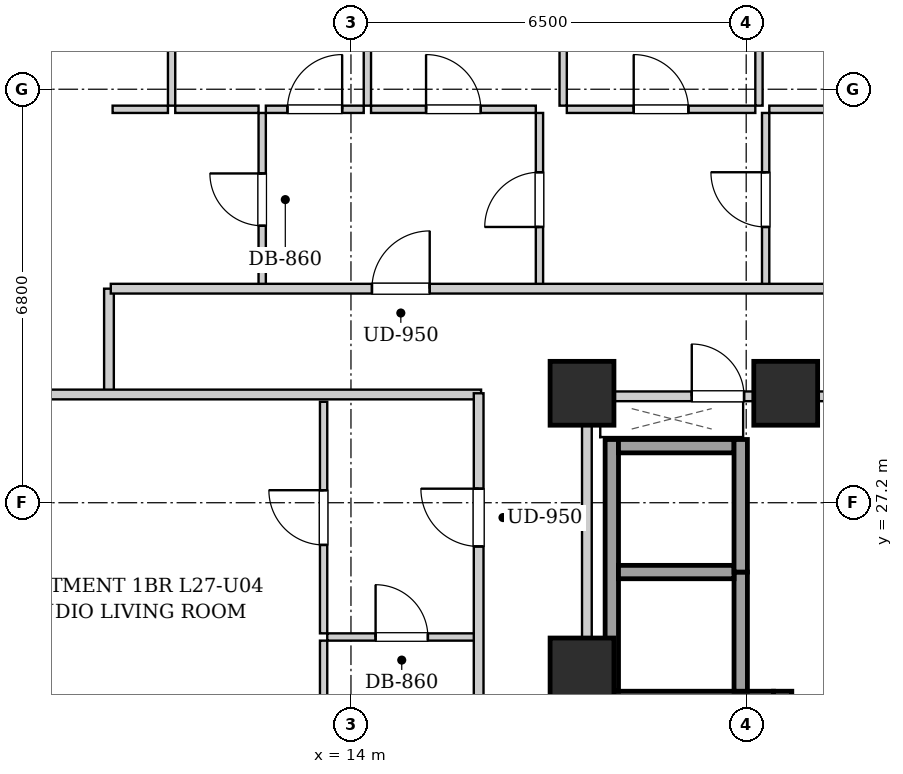
"""IFC4 building model, lengths in metres.
Left out: names, types, materials, properties, quantities, classifications, styles, units other than length and angle.
Written with IfcOpenShell. Run it as: python <this file> out.ifc"""

import sys

from ifc_helpers import new_model, si_unit, direction, frame, frame_2d, origin, origin_2d, place, context, subcontext, project, spatial, rectangle, extrude, element, fill, save


model = new_model("IFC4")
c1 = context("Model", 3, precision=1e-05, world=origin(), true_north=direction((0.0, 1.0)))
c2 = subcontext(c1, "Body", "Model", "MODEL_VIEW")
j1 = project(units=[si_unit("LENGTHUNIT", "METRE"), si_unit("PLANEANGLEUNIT", "RADIAN")], contexts=[c1])
p1 = place(None, origin())
s1 = spatial("IfcSite", under=j1, at=p1, CompositionType="ELEMENT")
p2 = place(p1, origin())
s2 = spatial("IfcBuilding", under=s1, at=p2, CompositionType="ELEMENT")
p3 = place(p2, frame((0.0, 0.0, 97.5)))
s3 = spatial("IfcBuildingStorey", under=s2, at=p3, CompositionType="ELEMENT", Elevation=97.5)
for number, where, z_axis, x_axis in (
    (1, (17.8, 29.0, 0.0), (0.0, 0.0, 1.0), (1.0, 0.0, 0.0)),
    (2, (21.15, 29.0, 0.0), (0.0, 0.0, 1.0), (1.0, 0.0, 0.0)),
    (3, (17.8, 24.45, 0.0), (0.0, 0.0, 1.0), (1.0, 0.0, 0.0)),
):
    element("IfcColumn", number, at=place(p3, frame(where, z_axis=z_axis, x_axis=x_axis)), inside=s3, PredefinedType="COLUMN", context=c2, shape_type="SweptSolid", body=[
        extrude(rectangle(XDim=1.05, YDim=1.05, at=origin_2d()), origin(), (0.0, 0.0, 1.0), 3.2),
    ])
for number, where, z_axis, x_axis in (
    (4, (17.95, 15.1, 0.0), (0.0, 0.0, 1.0), (0.0, 1.0, 0.0)),
    (5, (21.1, 15.1, 0.0), (0.0, 0.0, 1.0), (0.0, 1.0, 0.0)),
):
    element("IfcWall", number, at=place(p3, frame(where, z_axis=z_axis, x_axis=x_axis)), inside=s3, PredefinedType="SHEAR", context=c2, shape_type="SweptSolid", body=[
        extrude(rectangle(XDim=9.0, YDim=0.3, at=frame_2d((4.5, 0.0))), origin(), (0.0, 0.0, 1.0), 2.94),
    ])
p4 = place(p3, frame((18.1, 23.95, 0.0), z_axis=(0.0, 0.0, 1.0), x_axis=(1.0, 0.0, 0.0)))
e6 = element("IfcWall", 6, at=p4, inside=s3, PredefinedType="SHEAR", context=c2, shape_type="SweptSolid", body=[
    extrude(rectangle(XDim=2.85, YDim=0.3, at=frame_2d((1.425, 0.0))), origin(), (0.0, 0.0, 1.0), 2.94),
])
p5 = place(p3, frame((18.29, 24.1, 0.0), z_axis=(0.0, 0.0, 1.0), x_axis=(0.0, 1.0, 0.0)))
e7 = element("IfcWall", 7, at=p5, inside=s3, PredefinedType="SHEAR", context=c2, shape_type="SweptSolid", body=[
    extrude(rectangle(XDim=4.14, YDim=0.22, at=frame_2d((2.07, 0.0))), origin(), (0.0, 0.0, 1.0), 2.94),
])
p6 = place(p3, frame((20.41, 24.1, 0.0), z_axis=(0.0, 0.0, 1.0), x_axis=(0.0, 1.0, 0.0)))
e8 = element("IfcWall", 8, at=p6, inside=s3, PredefinedType="SHEAR", context=c2, shape_type="SweptSolid", body=[
    extrude(rectangle(XDim=1.96, YDim=0.22, at=frame_2d((0.98, 0.0))), origin(), (0.0, 0.0, 1.0), 2.94),
])
for number, where, z_axis, x_axis in (
    (9, (18.4, 26.06, 0.0), (0.0, 0.0, 1.0), (1.0, 0.0, 0.0)),
    (10, (18.4, 28.13, 0.0), (0.0, 0.0, 1.0), (1.0, 0.0, 0.0)),
):
    element("IfcWall", number, at=place(p3, frame(where, z_axis=z_axis, x_axis=x_axis)), inside=s3, PredefinedType="SHEAR", context=c2, shape_type="SweptSolid", body=[
        extrude(rectangle(XDim=1.9, YDim=0.22, at=frame_2d((0.95, 0.0))), origin(), (0.0, 0.0, 1.0), 2.94),
    ])
p7 = place(p3, frame((20.41, 26.06, 0.0), z_axis=(0.0, 0.0, 1.0), x_axis=(0.0, 1.0, 0.0)))
e11 = element("IfcWall", 11, at=p7, inside=s3, PredefinedType="SHEAR", context=c2, shape_type="SweptSolid", body=[
    extrude(rectangle(XDim=2.18, YDim=0.22, at=frame_2d((1.09, 0.0))), origin(), (0.0, 0.0, 1.0), 2.94),
])
p8 = place(p3, frame((17.88, 24.12, 0.0), z_axis=(0.0, 0.0, 1.0), x_axis=(0.0, 1.0, 0.0)))
e12 = element("IfcWall", 12, at=p8, inside=s3, PredefinedType="PARTITIONING", context=c2, shape_type="SweptSolid", body=[
    extrude(rectangle(XDim=4.76, YDim=0.16, at=frame_2d((2.38, 0.0))), origin(), (0.0, 0.0, 1.0), 2.275),
])
p9 = place(p3, frame((17.96, 28.95, 0.0), z_axis=(0.0, 0.0, 1.0), x_axis=(1.0, 0.0, 0.0)))
e13 = element("IfcWall", 13, at=p9, inside=s3, PredefinedType="PARTITIONING", context=c2, shape_type="SweptSolid", body=[
    extrude(rectangle(XDim=4.29, YDim=0.16, at=frame_2d((2.145, 0.0))), origin(), (0.0, 0.0, 1.0), 2.313),
])
p10 = place(p9, frame((1.645, 0.0, 0.0)))
e14 = element("IfcOpeningElement", 14, at=p10, cuts=e13, PredefinedType="OPENING", context=c2, shape_type="SweptSolid", body=[
    extrude(rectangle(XDim=0.86, YDim=2.05, at=frame_2d((0.43, 1.025))), frame((0.0, 0.09, 0.0), z_axis=(0.0, -1.0, 0.0), x_axis=(1.0, 0.0, 0.0)), (0.0, 0.0, 1.0), 0.18),
])
p11 = place(p3, frame((10.02, 28.98, 0.0), z_axis=(0.0, 0.0, 1.0), x_axis=(0.0, 1.0, 0.0)))
e15 = element("IfcWall", 15, at=p11, inside=s3, PredefinedType="PARTITIONING", context=c2, shape_type="SweptSolid", body=[
    extrude(rectangle(XDim=1.74, YDim=0.16, at=frame_2d((0.87, 0.0))), origin(), (0.0, 0.0, 1.0), 2.94),
])
p12 = place(p3, frame((7.78, 28.98, 0.0), z_axis=(0.0, 0.0, 1.0), x_axis=(1.0, 0.0, 0.0)))
e16 = element("IfcWall", 16, at=p12, inside=s3, PredefinedType="PARTITIONING", context=c2, shape_type="SweptSolid", body=[
    extrude(rectangle(XDim=8.36, YDim=0.16, at=frame_2d((4.18, 0.0))), origin(), (0.0, 0.0, 1.0), 2.313),
])
p13 = place(p3, frame((12.54, 30.76, 0.0), z_axis=(0.0, 0.0, 1.0), x_axis=(0.0, 1.0, 0.0)))
e17 = element("IfcWall", 17, at=p13, inside=s3, PredefinedType="PARTITIONING", context=c2, shape_type="SweptSolid", body=[
    extrude(rectangle(XDim=2.85, YDim=0.12, at=frame_2d((1.425, 0.0))), origin(), (0.0, 0.0, 1.0), 2.94),
])
p14 = place(p13, frame((0.995, 0.0, 0.0)))
e18 = element("IfcOpeningElement", 18, at=p14, cuts=e17, PredefinedType="OPENING", context=c2, shape_type="SweptSolid", body=[
    extrude(rectangle(XDim=0.86, YDim=2.05, at=frame_2d((0.43, 1.025))), frame((0.0, 0.07, 0.0), z_axis=(0.0, -1.0, 0.0), x_axis=(1.0, 0.0, 0.0)), (0.0, 0.0, 1.0), 0.14),
])
p15 = place(p3, frame((10.08, 33.67, 0.0), z_axis=(0.0, 0.0, 1.0), x_axis=(1.0, 0.0, 0.0)))
e19 = element("IfcWall", 19, at=p15, inside=s3, PredefinedType="PARTITIONING", context=c2, shape_type="SweptSolid", body=[
    extrude(rectangle(XDim=0.91, YDim=0.12, at=frame_2d((0.455, 0.0))), origin(), (0.0, 0.0, 1.0), 2.94),
])
p16 = place(p3, frame((11.11, 33.67, 0.0), z_axis=(0.0, 0.0, 1.0), x_axis=(1.0, 0.0, 0.0)))
e20 = element("IfcWall", 20, at=p16, inside=s3, PredefinedType="PARTITIONING", context=c2, shape_type="SweptSolid", body=[
    extrude(rectangle(XDim=1.37, YDim=0.12, at=frame_2d((0.685, 0.0))), origin(), (0.0, 0.0, 1.0), 2.94),
])
p17 = place(p3, frame((17.1, 30.76, 0.0), z_axis=(0.0, 0.0, 1.0), x_axis=(0.0, 1.0, 0.0)))
e21 = element("IfcWall", 21, at=p17, inside=s3, PredefinedType="PARTITIONING", context=c2, shape_type="SweptSolid", body=[
    extrude(rectangle(XDim=2.85, YDim=0.12, at=frame_2d((1.425, 0.0))), origin(), (0.0, 0.0, 1.0), 2.94),
])
p18 = place(p17, frame((0.975, 0.0, 0.0)))
e22 = element("IfcOpeningElement", 22, at=p18, cuts=e21, PredefinedType="OPENING", context=c2, shape_type="SweptSolid", body=[
    extrude(rectangle(XDim=0.9, YDim=2.05, at=frame_2d((0.45, 1.025))), frame((0.0, 0.07, 0.0), z_axis=(0.0, -1.0, 0.0), x_axis=(1.0, 0.0, 0.0)), (0.0, 0.0, 1.0), 0.14),
])
p19 = place(p3, frame((12.6, 33.67, 0.0), z_axis=(0.0, 0.0, 1.0), x_axis=(1.0, 0.0, 0.0)))
e23 = element("IfcWall", 23, at=p19, inside=s3, PredefinedType="PARTITIONING", context=c2, shape_type="SweptSolid", body=[
    extrude(rectangle(XDim=1.61, YDim=0.12, at=frame_2d((0.805, 0.0))), origin(), (0.0, 0.0, 1.0), 2.94),
])
p20 = place(p19, frame((0.355, 0.0, 0.0)))
e24 = element("IfcOpeningElement", 24, at=p20, cuts=e23, PredefinedType="OPENING", context=c2, shape_type="SweptSolid", body=[
    extrude(rectangle(XDim=0.9, YDim=2.05, at=frame_2d((0.45, 1.025))), frame((0.0, 0.07, 0.0), z_axis=(0.0, -1.0, 0.0), x_axis=(1.0, 0.0, 0.0)), (0.0, 0.0, 1.0), 0.14),
])
p21 = place(p3, frame((14.33, 33.67, 0.0), z_axis=(0.0, 0.0, 1.0), x_axis=(1.0, 0.0, 0.0)))
e25 = element("IfcWall", 25, at=p21, inside=s3, PredefinedType="PARTITIONING", context=c2, shape_type="SweptSolid", body=[
    extrude(rectangle(XDim=2.71, YDim=0.12, at=frame_2d((1.355, 0.0))), origin(), (0.0, 0.0, 1.0), 2.94),
])
p22 = place(p21, frame((0.905, 0.0, 0.0)))
e26 = element("IfcOpeningElement", 26, at=p22, cuts=e25, PredefinedType="OPENING", context=c2, shape_type="SweptSolid", body=[
    extrude(rectangle(XDim=0.9, YDim=2.05, at=frame_2d((0.45, 1.025))), frame((0.0, 0.07, 0.0), z_axis=(0.0, -1.0, 0.0), x_axis=(1.0, 0.0, 0.0)), (0.0, 0.0, 1.0), 0.14),
])
p23 = place(p3, frame((20.82, 30.76, 0.0), z_axis=(0.0, 0.0, 1.0), x_axis=(0.0, 1.0, 0.0)))
e27 = element("IfcWall", 27, at=p23, inside=s3, PredefinedType="PARTITIONING", context=c2, shape_type="SweptSolid", body=[
    extrude(rectangle(XDim=2.85, YDim=0.12, at=frame_2d((1.425, 0.0))), origin(), (0.0, 0.0, 1.0), 2.94),
])
p24 = place(p23, frame((0.975, 0.0, 0.0)))
e28 = element("IfcOpeningElement", 28, at=p24, cuts=e27, PredefinedType="OPENING", context=c2, shape_type="SweptSolid", body=[
    extrude(rectangle(XDim=0.9, YDim=2.05, at=frame_2d((0.45, 1.025))), frame((0.0, 0.07, 0.0), z_axis=(0.0, -1.0, 0.0), x_axis=(1.0, 0.0, 0.0)), (0.0, 0.0, 1.0), 0.14),
])
p25 = place(p3, frame((17.55, 33.67, 0.0), z_axis=(0.0, 0.0, 1.0), x_axis=(1.0, 0.0, 0.0)))
e29 = element("IfcWall", 29, at=p25, inside=s3, PredefinedType="PARTITIONING", context=c2, shape_type="SweptSolid", body=[
    extrude(rectangle(XDim=3.1, YDim=0.12, at=frame_2d((1.55, 0.0))), origin(), (0.0, 0.0, 1.0), 2.94),
])
p26 = place(p25, frame((1.1, 0.0, 0.0)))
e30 = element("IfcOpeningElement", 30, at=p26, cuts=e29, PredefinedType="OPENING", context=c2, shape_type="SweptSolid", body=[
    extrude(rectangle(XDim=0.9, YDim=2.05, at=frame_2d((0.45, 1.025))), frame((0.0, 0.07, 0.0), z_axis=(0.0, -1.0, 0.0), x_axis=(1.0, 0.0, 0.0)), (0.0, 0.0, 1.0), 0.14),
])
p27 = place(p3, frame((20.88, 33.67, 0.0), z_axis=(0.0, 0.0, 1.0), x_axis=(1.0, 0.0, 0.0)))
e31 = element("IfcWall", 31, at=p27, inside=s3, PredefinedType="PARTITIONING", context=c2, shape_type="SweptSolid", body=[
    extrude(rectangle(XDim=2.99, YDim=0.12, at=frame_2d((1.495, 0.0))), origin(), (0.0, 0.0, 1.0), 2.94),
])
p28 = place(p27, frame((1.045, 0.0, 0.0)))
e32 = element("IfcOpeningElement", 32, at=p28, cuts=e31, PredefinedType="OPENING", context=c2, shape_type="SweptSolid", body=[
    extrude(rectangle(XDim=0.9, YDim=2.05, at=frame_2d((0.45, 1.025))), frame((0.0, 0.07, 0.0), z_axis=(0.0, -1.0, 0.0), x_axis=(1.0, 0.0, 0.0)), (0.0, 0.0, 1.0), 0.14),
])
p29 = place(p3, frame((11.05, 33.73, 0.0), z_axis=(0.0, 0.0, 1.0), x_axis=(0.0, 1.0, 0.0)))
e33 = element("IfcWall", 33, at=p29, inside=s3, PredefinedType="PARTITIONING", context=c2, shape_type="SweptSolid", body=[
    extrude(rectangle(XDim=9.29, YDim=0.12, at=frame_2d((4.645, 0.0))), origin(), (0.0, 0.0, 1.0), 2.94),
])
p30 = place(p29, frame((4.18, 0.0, 0.0)))
e34 = element("IfcOpeningElement", 34, at=p30, cuts=e33, PredefinedType="OPENING", context=c2, shape_type="SweptSolid", body=[
    extrude(rectangle(XDim=0.9, YDim=2.05, at=frame_2d((0.45, 1.025))), frame((0.0, 0.07, 0.0), z_axis=(0.0, -1.0, 0.0), x_axis=(1.0, 0.0, 0.0)), (0.0, 0.0, 1.0), 0.14),
])
p31 = place(p3, frame((14.27, 33.73, 0.0), z_axis=(0.0, 0.0, 1.0), x_axis=(0.0, 1.0, 0.0)))
e35 = element("IfcWall", 35, at=p31, inside=s3, PredefinedType="PARTITIONING", context=c2, shape_type="SweptSolid", body=[
    extrude(rectangle(XDim=9.29, YDim=0.12, at=frame_2d((4.645, 0.0))), origin(), (0.0, 0.0, 1.0), 2.94),
])
p32 = place(p31, frame((4.18, 0.0, 0.0)))
e36 = element("IfcOpeningElement", 36, at=p32, cuts=e35, PredefinedType="OPENING", context=c2, shape_type="SweptSolid", body=[
    extrude(rectangle(XDim=0.9, YDim=2.05, at=frame_2d((0.45, 1.025))), frame((0.0, 0.07, 0.0), z_axis=(0.0, -1.0, 0.0), x_axis=(1.0, 0.0, 0.0)), (0.0, 0.0, 1.0), 0.14),
])
p33 = place(p3, frame((17.49, 33.73, 0.0), z_axis=(0.0, 0.0, 1.0), x_axis=(0.0, 1.0, 0.0)))
e37 = element("IfcWall", 37, at=p33, inside=s3, PredefinedType="PARTITIONING", context=c2, shape_type="SweptSolid", body=[
    extrude(rectangle(XDim=9.29, YDim=0.12, at=frame_2d((4.645, 0.0))), origin(), (0.0, 0.0, 1.0), 2.94),
])
p34 = place(p33, frame((4.18, 0.0, 0.0)))
e38 = element("IfcOpeningElement", 38, at=p34, cuts=e37, PredefinedType="OPENING", context=c2, shape_type="SweptSolid", body=[
    extrude(rectangle(XDim=0.9, YDim=2.05, at=frame_2d((0.45, 1.025))), frame((0.0, 0.07, 0.0), z_axis=(0.0, -1.0, 0.0), x_axis=(1.0, 0.0, 0.0)), (0.0, 0.0, 1.0), 0.14),
])
p35 = place(p3, frame((20.71, 33.73, 0.0), z_axis=(0.0, 0.0, 1.0), x_axis=(0.0, 1.0, 0.0)))
e39 = element("IfcWall", 39, at=p35, inside=s3, PredefinedType="PARTITIONING", context=c2, shape_type="SweptSolid", body=[
    extrude(rectangle(XDim=9.29, YDim=0.12, at=frame_2d((4.645, 0.0))), origin(), (0.0, 0.0, 1.0), 2.94),
])
p36 = place(p35, frame((4.18, 0.0, 0.0)))
e40 = element("IfcOpeningElement", 40, at=p36, cuts=e39, PredefinedType="OPENING", context=c2, shape_type="SweptSolid", body=[
    extrude(rectangle(XDim=0.9, YDim=2.05, at=frame_2d((0.45, 1.025))), frame((0.0, 0.07, 0.0), z_axis=(0.0, -1.0, 0.0), x_axis=(1.0, 0.0, 0.0)), (0.0, 0.0, 1.0), 0.14),
])
p37 = place(p3, frame((13.61, 24.992, 0.0), z_axis=(0.0, 0.0, 1.0), x_axis=(1.0, 0.0, 0.0)))
e41 = element("IfcWall", 41, at=p37, inside=s3, PredefinedType="PARTITIONING", context=c2, shape_type="SweptSolid", body=[
    extrude(rectangle(XDim=2.45, YDim=0.12, at=frame_2d((1.225, 0.0))), origin(), (0.0, 0.0, 1.0), 2.94),
])
p38 = place(p37, frame((0.795, 0.0, 0.0)))
e42 = element("IfcOpeningElement", 42, at=p38, cuts=e41, PredefinedType="OPENING", context=c2, shape_type="SweptSolid", body=[
    extrude(rectangle(XDim=0.86, YDim=2.05, at=frame_2d((0.43, 1.025))), frame((0.0, 0.07, 0.0), z_axis=(0.0, -1.0, 0.0), x_axis=(1.0, 0.0, 0.0)), (0.0, 0.0, 1.0), 0.14),
])
p39 = place(p3, frame((13.55, 23.082, 0.0), z_axis=(0.0, 0.0, 1.0), x_axis=(0.0, 1.0, 0.0)))
e43 = element("IfcWall", 43, at=p39, inside=s3, PredefinedType="PARTITIONING", context=c2, shape_type="SweptSolid", body=[
    extrude(rectangle(XDim=1.85, YDim=0.12, at=frame_2d((0.925, 0.0))), origin(), (0.0, 0.0, 1.0), 2.94),
])
p40 = place(p3, frame((13.55, 25.052, 0.0), z_axis=(0.0, 0.0, 1.0), x_axis=(0.0, 1.0, 0.0)))
e44 = element("IfcWall", 44, at=p40, inside=s3, PredefinedType="PARTITIONING", context=c2, shape_type="SweptSolid", body=[
    extrude(rectangle(XDim=3.808, YDim=0.12, at=frame_2d((1.904, 0.0))), origin(), (0.0, 0.0, 1.0), 2.94),
])
p41 = place(p40, frame((1.454, 0.0, 0.0)))
e45 = element("IfcOpeningElement", 45, at=p41, cuts=e44, PredefinedType="OPENING", context=c2, shape_type="SweptSolid", body=[
    extrude(rectangle(XDim=0.9, YDim=2.05, at=frame_2d((0.45, 1.025))), frame((0.0, 0.07, 0.0), z_axis=(0.0, -1.0, 0.0), x_axis=(1.0, 0.0, 0.0)), (0.0, 0.0, 1.0), 0.14),
])
p42 = place(p3, frame((10.05, 30.72, 0.0), z_axis=(0.0, 0.0, 1.0), x_axis=(1.0, 0.0, 0.0)))
e46 = element("IfcWall", 46, at=p42, inside=s3, PredefinedType="PARTITIONING", context=c2, shape_type="SweptSolid", body=[
    extrude(rectangle(XDim=30.8, YDim=0.16, at=frame_2d((15.4, 0.0))), origin(), (0.0, 0.0, 1.0), 2.94),
])
p43 = place(p42, frame((4.295, 0.0, 0.0)))
e47 = element("IfcOpeningElement", 47, at=p43, cuts=e46, PredefinedType="OPENING", context=c2, shape_type="SweptSolid", body=[
    extrude(rectangle(XDim=0.95, YDim=2.1, at=frame_2d((0.475, 1.05))), frame((0.0, 0.09, 0.0), z_axis=(0.0, -1.0, 0.0), x_axis=(1.0, 0.0, 0.0)), (0.0, 0.0, 1.0), 0.18),
])
p44 = place(p3, frame((16.1, 15.07, 0.0), z_axis=(0.0, 0.0, 1.0), x_axis=(0.0, 1.0, 0.0)))
e48 = element("IfcWall", 48, at=p44, inside=s3, PredefinedType="PARTITIONING", context=c2, shape_type="SweptSolid", body=[
    extrude(rectangle(XDim=13.93, YDim=0.16, at=frame_2d((6.965, 0.0))), origin(), (0.0, 0.0, 1.0), 2.94),
])
p45 = place(p44, frame((4.661, 0.0, 0.0)))
e49 = element("IfcOpeningElement", 49, at=p45, cuts=e48, PredefinedType="OPENING", context=c2, shape_type="SweptSolid", body=[
    extrude(rectangle(XDim=0.95, YDim=2.1, at=frame_2d((0.475, 1.05))), frame((0.0, 0.09, 0.0), z_axis=(0.0, -1.0, 0.0), x_axis=(1.0, 0.0, 0.0)), (0.0, 0.0, 1.0), 0.18),
])
p46 = place(p44, frame((11.411, 0.0, 0.0)))
e50 = element("IfcOpeningElement", 50, at=p46, cuts=e48, PredefinedType="OPENING", context=c2, shape_type="SweptSolid", body=[
    extrude(rectangle(XDim=0.95, YDim=2.1, at=frame_2d((0.475, 1.05))), frame((0.0, 0.09, 0.0), z_axis=(0.0, -1.0, 0.0), x_axis=(1.0, 0.0, 0.0)), (0.0, 0.0, 1.0), 0.18),
])
p47 = place(p10, origin())
e51 = element("IfcDoor", 51, at=p47, inside=s3, OperationType="SINGLE_SWING_LEFT", PredefinedType="DOOR", context=c2, shape_type="SweptSolid", body=[
    extrude(rectangle(XDim=0.86, YDim=2.05, at=frame_2d((0.43, 1.025))), frame((0.0, 0.025, 0.0), z_axis=(0.0, -1.0, 0.0), x_axis=(1.0, 0.0, 0.0)), (0.0, 0.0, 1.0), 0.05),
])
fill(e14, e51)
p48 = place(p14, origin())
e52 = element("IfcDoor", 52, at=p48, inside=s3, OperationType="SINGLE_SWING_RIGHT", PredefinedType="DOOR", context=c2, shape_type="SweptSolid", body=[
    extrude(rectangle(XDim=0.86, YDim=2.05, at=frame_2d((0.43, 1.025))), frame((0.0, 0.025, 0.0), z_axis=(0.0, -1.0, 0.0), x_axis=(1.0, 0.0, 0.0)), (0.0, 0.0, 1.0), 0.05),
])
fill(e18, e52)
p49 = place(p18, origin())
e53 = element("IfcDoor", 53, at=p49, inside=s3, OperationType="SINGLE_SWING_LEFT", PredefinedType="DOOR", context=c2, shape_type="SweptSolid", body=[
    extrude(rectangle(XDim=0.9, YDim=2.05, at=frame_2d((0.45, 1.025))), frame((0.0, 0.025, 0.0), z_axis=(0.0, -1.0, 0.0), x_axis=(1.0, 0.0, 0.0)), (0.0, 0.0, 1.0), 0.05),
])
fill(e22, e53)
p50 = place(p20, origin())
e54 = element("IfcDoor", 54, at=p50, inside=s3, OperationType="SINGLE_SWING_RIGHT", PredefinedType="DOOR", context=c2, shape_type="SweptSolid", body=[
    extrude(rectangle(XDim=0.9, YDim=2.05, at=frame_2d((0.45, 1.025))), frame((0.0, 0.025, 0.0), z_axis=(0.0, -1.0, 0.0), x_axis=(1.0, 0.0, 0.0)), (0.0, 0.0, 1.0), 0.05),
])
fill(e24, e54)
p51 = place(p22, origin())
e55 = element("IfcDoor", 55, at=p51, inside=s3, OperationType="SINGLE_SWING_LEFT", PredefinedType="DOOR", context=c2, shape_type="SweptSolid", body=[
    extrude(rectangle(XDim=0.9, YDim=2.05, at=frame_2d((0.45, 1.025))), frame((0.0, 0.025, 0.0), z_axis=(0.0, -1.0, 0.0), x_axis=(1.0, 0.0, 0.0)), (0.0, 0.0, 1.0), 0.05),
])
fill(e26, e55)
p52 = place(p24, origin())
e56 = element("IfcDoor", 56, at=p52, inside=s3, OperationType="SINGLE_SWING_RIGHT", PredefinedType="DOOR", context=c2, shape_type="SweptSolid", body=[
    extrude(rectangle(XDim=0.9, YDim=2.05, at=frame_2d((0.45, 1.025))), frame((0.0, 0.025, 0.0), z_axis=(0.0, -1.0, 0.0), x_axis=(1.0, 0.0, 0.0)), (0.0, 0.0, 1.0), 0.05),
])
fill(e28, e56)
p53 = place(p26, origin())
e57 = element("IfcDoor", 57, at=p53, inside=s3, OperationType="SINGLE_SWING_LEFT", PredefinedType="DOOR", context=c2, shape_type="SweptSolid", body=[
    extrude(rectangle(XDim=0.9, YDim=2.05, at=frame_2d((0.45, 1.025))), frame((0.0, 0.025, 0.0), z_axis=(0.0, -1.0, 0.0), x_axis=(1.0, 0.0, 0.0)), (0.0, 0.0, 1.0), 0.05),
])
fill(e30, e57)
p54 = place(p38, origin())
e58 = element("IfcDoor", 58, at=p54, inside=s3, OperationType="SINGLE_SWING_LEFT", PredefinedType="DOOR", context=c2, shape_type="SweptSolid", body=[
    extrude(rectangle(XDim=0.86, YDim=2.05, at=frame_2d((0.43, 1.025))), frame((0.0, 0.025, 0.0), z_axis=(0.0, -1.0, 0.0), x_axis=(1.0, 0.0, 0.0)), (0.0, 0.0, 1.0), 0.05),
])
fill(e42, e58)
p55 = place(p41, origin())
e59 = element("IfcDoor", 59, at=p55, inside=s3, OperationType="SINGLE_SWING_RIGHT", PredefinedType="DOOR", context=c2, shape_type="SweptSolid", body=[
    extrude(rectangle(XDim=0.9, YDim=2.05, at=frame_2d((0.45, 1.025))), frame((0.0, 0.025, 0.0), z_axis=(0.0, -1.0, 0.0), x_axis=(1.0, 0.0, 0.0)), (0.0, 0.0, 1.0), 0.05),
])
fill(e45, e59)
p56 = place(p43, origin())
e60 = element("IfcDoor", 60, at=p56, inside=s3, OperationType="SINGLE_SWING_RIGHT", PredefinedType="DOOR", context=c2, shape_type="SweptSolid", body=[
    extrude(rectangle(XDim=0.95, YDim=2.1, at=frame_2d((0.475, 1.05))), frame((0.0, 0.025, 0.0), z_axis=(0.0, -1.0, 0.0), x_axis=(1.0, 0.0, 0.0)), (0.0, 0.0, 1.0), 0.05),
])
fill(e47, e60)
p57 = place(p46, origin())
e61 = element("IfcDoor", 61, at=p57, inside=s3, OperationType="SINGLE_SWING_RIGHT", PredefinedType="DOOR", context=c2, shape_type="SweptSolid", body=[
    extrude(rectangle(XDim=0.95, YDim=2.1, at=frame_2d((0.475, 1.05))), frame((0.0, 0.025, 0.0), z_axis=(0.0, -1.0, 0.0), x_axis=(1.0, 0.0, 0.0)), (0.0, 0.0, 1.0), 0.05),
])
fill(e50, e61)
save(model, sys.argv[1])
